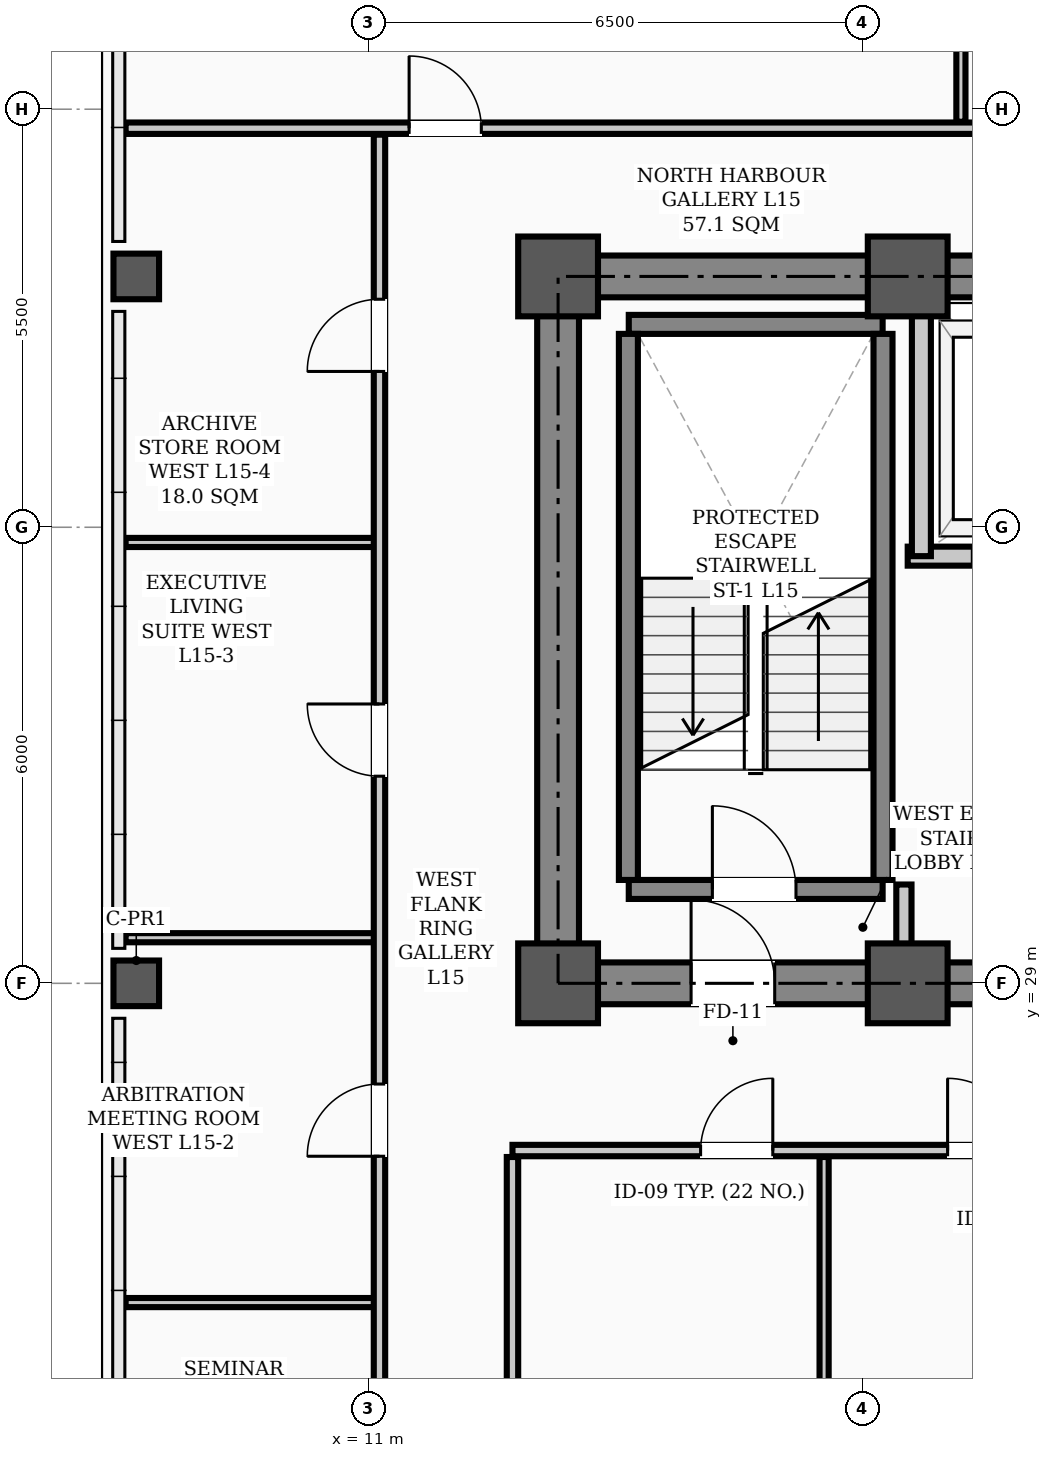
"""IFC4 building model, lengths in metres.
Left out: names, types, materials, properties, quantities, classifications, styles, units other than length and angle.
Written with IfcOpenShell. Run it as: python <this file> out.ifc"""

import sys

from ifc_helpers import new_model, si_unit, direction, frame, frame_2d, origin, origin_2d, place, context, subcontext, project, spatial, rectangle, hollow_rectangle, extrude, element, fill, save


model = new_model("IFC4")
c1 = context("Model", 3, precision=1e-05, world=origin(), true_north=direction((0.0, 1.0)))
c2 = subcontext(c1, "Body", "Model", "MODEL_VIEW")
j1 = project(units=[si_unit("LENGTHUNIT", "METRE"), si_unit("PLANEANGLEUNIT", "RADIAN")], contexts=[c1])
p1 = place(None, origin())
s1 = spatial("IfcSite", under=j1, at=p1, CompositionType="ELEMENT")
p2 = place(p1, origin())
s2 = spatial("IfcBuilding", under=s1, at=p2, CompositionType="ELEMENT")
p3 = place(p2, frame((0.0, 0.0, 61.6)))
s3 = spatial("IfcBuildingStorey", under=s2, at=p3, CompositionType="ELEMENT", Elevation=61.6)
for number, where, z_axis, x_axis in (
    (1, (13.5, 29.0, 0.0), (0.0, 0.0, 1.0), (1.0, 0.0, 0.0)),
    (2, (13.5, 38.3, 0.0), (0.0, 0.0, 1.0), (1.0, 0.0, 0.0)),
    (3, (18.1, 29.0, 0.0), (0.0, 0.0, 1.0), (1.0, 0.0, 0.0)),
    (4, (18.1, 38.3, 0.0), (0.0, 0.0, 1.0), (1.0, 0.0, 0.0)),
):
    element("IfcColumn", number, at=place(p3, frame(where, z_axis=z_axis, x_axis=x_axis)), inside=s3, PredefinedType="COLUMN", context=c2, shape_type="SweptSolid", body=[
        extrude(hollow_rectangle(XDim=1.05, YDim=1.05, WallThickness=0.038, InnerFilletRadius=0.019, OuterFilletRadius=0.057, at=origin_2d()), origin(), (0.0, 0.0, 1.0), 3.9),
    ])
for number, where, z_axis, x_axis in (
    (5, (7.95, 29.0, 0.0), (0.0, 0.0, 1.0), (1.0, 0.0, 0.0)),
    (6, (7.95, 38.3, 0.0), (0.0, 0.0, 1.0), (1.0, 0.0, 0.0)),
):
    element("IfcColumn", number, at=place(p3, frame(where, z_axis=z_axis, x_axis=x_axis)), inside=s3, PredefinedType="COLUMN", context=c2, shape_type="SweptSolid", body=[
        extrude(hollow_rectangle(XDim=0.6, YDim=0.6, WallThickness=0.026, InnerFilletRadius=0.013, OuterFilletRadius=0.039, at=origin_2d()), origin(), (0.0, 0.0, 1.0), 3.9),
    ])
p4 = place(p3, frame((13.5, 29.0, 0.0), z_axis=(0.0, 0.0, 1.0), x_axis=(1.0, 0.0, 0.0)))
e7 = element("IfcWall", 7, at=p4, inside=s3, PredefinedType="SHEAR", context=c2, shape_type="SweptSolid", body=[
    extrude(rectangle(XDim=30.5, YDim=0.55, at=frame_2d((15.25, 0.0))), origin(), (0.0, 0.0, 1.0), 3.72),
])
p5 = place(p4, frame((1.75, 0.0, 0.0)))
e8 = element("IfcOpeningElement", 8, at=p5, cuts=e7, PredefinedType="OPENING", context=c2, shape_type="SweptSolid", body=[
    extrude(rectangle(XDim=1.1, YDim=2.08, at=frame_2d((0.55, 1.04))), frame((0.0, 0.285, 0.0), z_axis=(0.0, -1.0, 0.0), x_axis=(1.0, 0.0, 0.0)), (0.0, 0.0, 1.0), 0.57),
])
p6 = place(p4, frame((26.7, 0.0, 0.0)))
e9 = element("IfcOpeningElement", 9, at=p6, cuts=e7, PredefinedType="OPENING", context=c2, shape_type="SweptSolid", body=[
    extrude(rectangle(XDim=1.1, YDim=2.08, at=frame_2d((0.55, 1.04))), frame((0.0, 0.285, 0.0), z_axis=(0.0, -1.0, 0.0), x_axis=(1.0, 0.0, 0.0)), (0.0, 0.0, 1.0), 0.57),
])
p7 = place(p4, frame((6.8, 0.0, 0.0)))
e10 = element("IfcOpeningElement", 10, at=p7, cuts=e7, PredefinedType="OPENING", context=c2, shape_type="SweptSolid", body=[
    extrude(rectangle(XDim=1.1, YDim=2.08, at=frame_2d((0.55, 1.04))), frame((0.0, 0.285, 0.0), z_axis=(0.0, -1.0, 0.0), x_axis=(1.0, 0.0, 0.0)), (0.0, 0.0, 1.0), 0.57),
])
p8 = place(p4, frame((13.2, 0.0, 0.0)))
e11 = element("IfcOpeningElement", 11, at=p8, cuts=e7, PredefinedType="OPENING", context=c2, shape_type="SweptSolid", body=[
    extrude(rectangle(XDim=1.6, YDim=2.08, at=frame_2d((0.8, 1.04))), frame((0.0, 0.285, 0.0), z_axis=(0.0, -1.0, 0.0), x_axis=(1.0, 0.0, 0.0)), (0.0, 0.0, 1.0), 0.57),
])
p9 = place(p4, frame((19.6, 0.0, 0.0)))
e12 = element("IfcOpeningElement", 12, at=p9, cuts=e7, PredefinedType="OPENING", context=c2, shape_type="SweptSolid", body=[
    extrude(rectangle(XDim=0.9, YDim=2.08, at=frame_2d((0.45, 1.04))), frame((0.0, 0.285, 0.0), z_axis=(0.0, -1.0, 0.0), x_axis=(1.0, 0.0, 0.0)), (0.0, 0.0, 1.0), 0.57),
])
p10 = place(p4, frame((21.6, 0.0, 0.0)))
e13 = element("IfcOpeningElement", 13, at=p10, cuts=e7, PredefinedType="OPENING", context=c2, shape_type="SweptSolid", body=[
    extrude(rectangle(XDim=0.9, YDim=2.08, at=frame_2d((0.45, 1.04))), frame((0.0, 0.285, 0.0), z_axis=(0.0, -1.0, 0.0), x_axis=(1.0, 0.0, 0.0)), (0.0, 0.0, 1.0), 0.57),
])
p11 = place(p3, frame((13.5, 38.3, 0.0), z_axis=(0.0, 0.0, 1.0), x_axis=(1.0, 0.0, 0.0)))
e14 = element("IfcWall", 14, at=p11, inside=s3, PredefinedType="SHEAR", context=c2, shape_type="SweptSolid", body=[
    extrude(rectangle(XDim=30.5, YDim=0.55, at=frame_2d((15.25, 0.0))), origin(), (0.0, 0.0, 1.0), 3.72),
])
p12 = place(p3, frame((13.5, 29.35, 0.0), z_axis=(0.0, 0.0, 1.0), x_axis=(0.0, 1.0, 0.0)))
e15 = element("IfcWall", 15, at=p12, inside=s3, PredefinedType="SHEAR", context=c2, shape_type="SweptSolid", body=[
    extrude(rectangle(XDim=8.6, YDim=0.55, at=frame_2d((4.3, 0.0))), origin(), (0.0, 0.0, 1.0), 3.72),
])
p13 = place(p3, frame((14.43, 30.235, 0.0), z_axis=(0.0, 0.0, 1.0), x_axis=(1.0, 0.0, 0.0)))
e16 = element("IfcWall", 16, at=p13, inside=s3, PredefinedType="STANDARD", context=c2, shape_type="SweptSolid", body=[
    extrude(rectangle(XDim=3.34, YDim=0.25, at=frame_2d((1.67, 0.0))), origin(), (0.0, 0.0, 1.0), 3.72),
])
p14 = place(p13, frame((1.1, 0.0, 0.0)))
e17 = element("IfcOpeningElement", 17, at=p14, cuts=e16, PredefinedType="OPENING", context=c2, shape_type="SweptSolid", body=[
    extrude(rectangle(XDim=1.1, YDim=2.08, at=frame_2d((0.55, 1.04))), frame((0.0, 0.135, 0.0), z_axis=(0.0, -1.0, 0.0), x_axis=(1.0, 0.0, 0.0)), (0.0, 0.0, 1.0), 0.27),
])
p15 = place(p3, frame((14.43, 37.669, 0.0), z_axis=(0.0, 0.0, 1.0), x_axis=(1.0, 0.0, 0.0)))
e18 = element("IfcWall", 18, at=p15, inside=s3, PredefinedType="STANDARD", context=c2, shape_type="SweptSolid", body=[
    extrude(rectangle(XDim=3.34, YDim=0.25, at=frame_2d((1.67, 0.0))), origin(), (0.0, 0.0, 1.0), 3.72),
])
for number, where, z_axis, x_axis in (
    (19, (14.425, 30.36, 0.0), (0.0, 0.0, 1.0), (0.0, 1.0, 0.0)),
    (20, (17.775, 30.36, 0.0), (0.0, 0.0, 1.0), (0.0, 1.0, 0.0)),
):
    element("IfcWall", number, at=place(p3, frame(where, z_axis=z_axis, x_axis=x_axis)), inside=s3, PredefinedType="STANDARD", context=c2, shape_type="SweptSolid", body=[
        extrude(rectangle(XDim=7.184, YDim=0.25, at=frame_2d((3.592, 0.0))), origin(), (0.0, 0.0, 1.0), 3.72),
    ])
p16 = place(p3, frame((18.1, 34.62, 0.0), z_axis=(0.0, 0.0, 1.0), x_axis=(1.0, 0.0, 0.0)))
e21 = element("IfcWall", 21, at=p16, inside=s3, PredefinedType="STANDARD", context=c2, shape_type="SweptSolid", body=[
    extrude(rectangle(XDim=5.35, YDim=0.25, at=frame_2d((2.675, 0.0))), origin(), (0.0, 0.0, 1.0), 3.72),
])
p17 = place(p16, frame((0.85, 0.0, 0.0)))
e22 = element("IfcOpeningElement", 22, at=p17, cuts=e21, PredefinedType="OPENING", context=c2, shape_type="SweptSolid", body=[
    extrude(rectangle(XDim=1.1, YDim=2.08, at=frame_2d((0.55, 1.04))), frame((0.0, 0.135, 0.0), z_axis=(0.0, -1.0, 0.0), x_axis=(1.0, 0.0, 0.0)), (0.0, 0.0, 1.0), 0.27),
])
p18 = place(p16, frame((3.45, 0.0, 0.0)))
e23 = element("IfcOpeningElement", 23, at=p18, cuts=e21, PredefinedType="OPENING", context=c2, shape_type="SweptSolid", body=[
    extrude(rectangle(XDim=1.1, YDim=2.08, at=frame_2d((0.55, 1.04))), frame((0.0, 0.135, 0.0), z_axis=(0.0, -1.0, 0.0), x_axis=(1.0, 0.0, 0.0)), (0.0, 0.0, 1.0), 0.27),
])
p19 = place(p3, frame((18.28, 34.62, 0.0), z_axis=(0.0, 0.0, 1.0), x_axis=(0.0, 1.0, 0.0)))
e24 = element("IfcWall", 24, at=p19, inside=s3, PredefinedType="STANDARD", context=c2, shape_type="SweptSolid", body=[
    extrude(rectangle(XDim=3.33, YDim=0.25, at=frame_2d((1.665, 0.0))), origin(), (0.0, 0.0, 1.0), 3.3),
])
p20 = place(p3, frame((12.9, 26.8, 0.0), z_axis=(0.0, 0.0, 1.0), x_axis=(1.0, 0.0, 0.0)))
e25 = element("IfcWall", 25, at=p20, inside=s3, PredefinedType="PARTITIONING", context=c2, shape_type="SweptSolid", body=[
    extrude(rectangle(XDim=31.7, YDim=0.15, at=frame_2d((15.85, 0.0))), origin(), (0.0, 0.0, 1.0), 3.1),
])
p21 = place(p20, frame((13.6, 0.0, 0.0)))
e26 = element("IfcOpeningElement", 26, at=p21, cuts=e25, PredefinedType="OPENING", context=c2, shape_type="SweptSolid", body=[
    extrude(rectangle(XDim=1.6, YDim=2.08, at=frame_2d((0.8, 1.04))), frame((0.0, 0.085, 0.0), z_axis=(0.0, -1.0, 0.0), x_axis=(1.0, 0.0, 0.0)), (0.0, 0.0, 1.0), 0.17),
])
p22 = place(p20, frame((2.475, 0.0, 0.0)))
e27 = element("IfcOpeningElement", 27, at=p22, cuts=e25, PredefinedType="OPENING", context=c2, shape_type="SweptSolid", body=[
    extrude(rectangle(XDim=0.95, YDim=2.08, at=frame_2d((0.475, 1.04))), frame((0.0, 0.085, 0.0), z_axis=(0.0, -1.0, 0.0), x_axis=(1.0, 0.0, 0.0)), (0.0, 0.0, 1.0), 0.17),
])
p23 = place(p20, frame((5.725, 0.0, 0.0)))
e28 = element("IfcOpeningElement", 28, at=p23, cuts=e25, PredefinedType="OPENING", context=c2, shape_type="SweptSolid", body=[
    extrude(rectangle(XDim=0.95, YDim=2.08, at=frame_2d((0.475, 1.04))), frame((0.0, 0.085, 0.0), z_axis=(0.0, -1.0, 0.0), x_axis=(1.0, 0.0, 0.0)), (0.0, 0.0, 1.0), 0.17),
])
p24 = place(p20, frame((8.875, 0.0, 0.0)))
e29 = element("IfcOpeningElement", 29, at=p24, cuts=e25, PredefinedType="OPENING", context=c2, shape_type="SweptSolid", body=[
    extrude(rectangle(XDim=0.95, YDim=2.08, at=frame_2d((0.475, 1.04))), frame((0.0, 0.085, 0.0), z_axis=(0.0, -1.0, 0.0), x_axis=(1.0, 0.0, 0.0)), (0.0, 0.0, 1.0), 0.17),
])
p25 = place(p20, frame((16.075, 0.0, 0.0)))
e30 = element("IfcOpeningElement", 30, at=p25, cuts=e25, PredefinedType="OPENING", context=c2, shape_type="SweptSolid", body=[
    extrude(rectangle(XDim=0.95, YDim=2.08, at=frame_2d((0.475, 1.04))), frame((0.0, 0.085, 0.0), z_axis=(0.0, -1.0, 0.0), x_axis=(1.0, 0.0, 0.0)), (0.0, 0.0, 1.0), 0.17),
])
p26 = place(p20, frame((22.525, 0.0, 0.0)))
e31 = element("IfcOpeningElement", 31, at=p26, cuts=e25, PredefinedType="OPENING", context=c2, shape_type="SweptSolid", body=[
    extrude(rectangle(XDim=0.95, YDim=2.08, at=frame_2d((0.475, 1.04))), frame((0.0, 0.085, 0.0), z_axis=(0.0, -1.0, 0.0), x_axis=(1.0, 0.0, 0.0)), (0.0, 0.0, 1.0), 0.17),
])
p27 = place(p20, frame((28.825, 0.0, 0.0)))
e32 = element("IfcOpeningElement", 32, at=p27, cuts=e25, PredefinedType="OPENING", context=c2, shape_type="SweptSolid", body=[
    extrude(rectangle(XDim=0.95, YDim=2.08, at=frame_2d((0.475, 1.04))), frame((0.0, 0.085, 0.0), z_axis=(0.0, -1.0, 0.0), x_axis=(1.0, 0.0, 0.0)), (0.0, 0.0, 1.0), 0.17),
])
p28 = place(p3, frame((7.81, 24.8, 0.0), z_axis=(0.0, 0.0, 1.0), x_axis=(1.0, 0.0, 0.0)))
e33 = element("IfcWall", 33, at=p28, inside=s3, PredefinedType="PARTITIONING", context=c2, shape_type="SweptSolid", body=[
    extrude(rectangle(XDim=3.34, YDim=0.12, at=frame_2d((1.67, 0.0))), origin(), (0.0, 0.0, 1.0), 3.212),
])
p29 = place(p3, frame((7.81, 29.6, 0.0), z_axis=(0.0, 0.0, 1.0), x_axis=(1.0, 0.0, 0.0)))
e34 = element("IfcWall", 34, at=p29, inside=s3, PredefinedType="PARTITIONING", context=c2, shape_type="SweptSolid", body=[
    extrude(rectangle(XDim=3.34, YDim=0.12, at=frame_2d((1.67, 0.0))), origin(), (0.0, 0.0, 1.0), 3.0),
])
p30 = place(p3, frame((7.81, 34.8, 0.0), z_axis=(0.0, 0.0, 1.0), x_axis=(1.0, 0.0, 0.0)))
e35 = element("IfcWall", 35, at=p30, inside=s3, PredefinedType="PARTITIONING", context=c2, shape_type="SweptSolid", body=[
    extrude(rectangle(XDim=3.34, YDim=0.12, at=frame_2d((1.67, 0.0))), origin(), (0.0, 0.0, 1.0), 3.212),
])
p31 = place(p3, frame((7.81, 40.25, 0.0), z_axis=(0.0, 0.0, 1.0), x_axis=(1.0, 0.0, 0.0)))
e36 = element("IfcWall", 36, at=p31, inside=s3, PredefinedType="PARTITIONING", context=c2, shape_type="SweptSolid", body=[
    extrude(rectangle(XDim=49.38, YDim=0.15, at=frame_2d((24.69, 0.0))), origin(), (0.0, 0.0, 1.0), 3.1),
])
p32 = place(p31, frame((3.73, 0.0, 0.0)))
e37 = element("IfcOpeningElement", 37, at=p32, cuts=e36, PredefinedType="OPENING", context=c2, shape_type="SweptSolid", body=[
    extrude(rectangle(XDim=0.95, YDim=2.08, at=frame_2d((0.475, 1.04))), frame((0.0, 0.085, 0.0), z_axis=(0.0, -1.0, 0.0), x_axis=(1.0, 0.0, 0.0)), (0.0, 0.0, 1.0), 0.17),
])
p33 = place(p31, frame((13.815, 0.0, 0.0)))
e38 = element("IfcOpeningElement", 38, at=p33, cuts=e36, PredefinedType="OPENING", context=c2, shape_type="SweptSolid", body=[
    extrude(rectangle(XDim=0.95, YDim=2.08, at=frame_2d((0.475, 1.04))), frame((0.0, 0.085, 0.0), z_axis=(0.0, -1.0, 0.0), x_axis=(1.0, 0.0, 0.0)), (0.0, 0.0, 1.0), 0.17),
])
p34 = place(p31, frame((19.965, 0.0, 0.0)))
e39 = element("IfcOpeningElement", 39, at=p34, cuts=e36, PredefinedType="OPENING", context=c2, shape_type="SweptSolid", body=[
    extrude(rectangle(XDim=0.95, YDim=2.08, at=frame_2d((0.475, 1.04))), frame((0.0, 0.085, 0.0), z_axis=(0.0, -1.0, 0.0), x_axis=(1.0, 0.0, 0.0)), (0.0, 0.0, 1.0), 0.17),
])
p35 = place(p31, frame((30.815, 0.0, 0.0)))
e40 = element("IfcOpeningElement", 40, at=p35, cuts=e36, PredefinedType="OPENING", context=c2, shape_type="SweptSolid", body=[
    extrude(rectangle(XDim=0.95, YDim=2.08, at=frame_2d((0.475, 1.04))), frame((0.0, 0.085, 0.0), z_axis=(0.0, -1.0, 0.0), x_axis=(1.0, 0.0, 0.0)), (0.0, 0.0, 1.0), 0.17),
])
p36 = place(p31, frame((37.2, 0.0, 0.0)))
e41 = element("IfcOpeningElement", 41, at=p36, cuts=e36, PredefinedType="OPENING", context=c2, shape_type="SweptSolid", body=[
    extrude(rectangle(XDim=0.95, YDim=2.08, at=frame_2d((0.475, 1.04))), frame((0.0, 0.085, 0.0), z_axis=(0.0, -1.0, 0.0), x_axis=(1.0, 0.0, 0.0)), (0.0, 0.0, 1.0), 0.17),
])
p37 = place(p3, frame((18.05, 29.285, 0.0), z_axis=(0.0, 0.0, 1.0), x_axis=(0.0, 1.0, 0.0)))
e42 = element("IfcWall", 42, at=p37, inside=s3, PredefinedType="STANDARD", context=c2, shape_type="SweptSolid", body=[
    extrude(rectangle(XDim=1.015, YDim=0.2, at=frame_2d((0.508, 0.0))), origin(), (0.0, 0.0, 1.0), 3.3),
])
p38 = place(p3, frame((11.15, 17.635, 0.0), z_axis=(0.0, 0.0, 1.0), x_axis=(0.0, 1.0, 0.0)))
e43 = element("IfcWall", 43, at=p38, inside=s3, PredefinedType="PARTITIONING", context=c2, shape_type="SweptSolid", body=[
    extrude(rectangle(XDim=22.53, YDim=0.15, at=frame_2d((11.265, 0.0))), origin(), (0.0, 0.0, 1.0), 3.0),
])
p39 = place(p38, frame((3.065, 0.0, 0.0)))
e44 = element("IfcOpeningElement", 44, at=p39, cuts=e43, PredefinedType="OPENING", context=c2, shape_type="SweptSolid", body=[
    extrude(rectangle(XDim=0.95, YDim=2.08, at=frame_2d((0.475, 1.04))), frame((0.0, 0.085, 0.0), z_axis=(0.0, -1.0, 0.0), x_axis=(1.0, 0.0, 0.0)), (0.0, 0.0, 1.0), 0.17),
])
p40 = place(p38, frame((9.09, 0.0, 0.0)))
e45 = element("IfcOpeningElement", 45, at=p40, cuts=e43, PredefinedType="OPENING", context=c2, shape_type="SweptSolid", body=[
    extrude(rectangle(XDim=0.95, YDim=2.08, at=frame_2d((0.475, 1.04))), frame((0.0, 0.085, 0.0), z_axis=(0.0, -1.0, 0.0), x_axis=(1.0, 0.0, 0.0)), (0.0, 0.0, 1.0), 0.17),
])
p41 = place(p38, frame((14.09, 0.0, 0.0)))
e46 = element("IfcOpeningElement", 46, at=p41, cuts=e43, PredefinedType="OPENING", context=c2, shape_type="SweptSolid", body=[
    extrude(rectangle(XDim=0.95, YDim=2.08, at=frame_2d((0.475, 1.04))), frame((0.0, 0.085, 0.0), z_axis=(0.0, -1.0, 0.0), x_axis=(1.0, 0.0, 0.0)), (0.0, 0.0, 1.0), 0.17),
])
p42 = place(p38, frame((19.415, 0.0, 0.0)))
e47 = element("IfcOpeningElement", 47, at=p42, cuts=e43, PredefinedType="OPENING", context=c2, shape_type="SweptSolid", body=[
    extrude(rectangle(XDim=0.95, YDim=2.08, at=frame_2d((0.475, 1.04))), frame((0.0, 0.085, 0.0), z_axis=(0.0, -1.0, 0.0), x_axis=(1.0, 0.0, 0.0)), (0.0, 0.0, 1.0), 0.17),
])
p43 = place(p3, frame((12.9, 19.335, 0.0), z_axis=(0.0, 0.0, 1.0), x_axis=(0.0, 1.0, 0.0)))
e48 = element("IfcWall", 48, at=p43, inside=s3, PredefinedType="PARTITIONING", context=c2, shape_type="SweptSolid", body=[
    extrude(rectangle(XDim=7.38, YDim=0.15, at=frame_2d((3.69, 0.0))), origin(), (0.0, 0.0, 1.0), 3.0),
])
p44 = place(p3, frame((17.0, 19.335, 0.0), z_axis=(0.0, 0.0, 1.0), x_axis=(0.0, 1.0, 0.0)))
e49 = element("IfcWall", 49, at=p44, inside=s3, PredefinedType="PARTITIONING", context=c2, shape_type="SweptSolid", body=[
    extrude(rectangle(XDim=7.38, YDim=0.12, at=frame_2d((3.69, 0.0))), origin(), (0.0, 0.0, 1.0), 3.0),
])
p45 = place(p3, frame((18.8, 40.335, 0.0), z_axis=(0.0, 0.0, 1.0), x_axis=(0.0, 1.0, 0.0)))
e50 = element("IfcWall", 50, at=p45, inside=s3, PredefinedType="PARTITIONING", context=c2, shape_type="SweptSolid", body=[
    extrude(rectangle(XDim=6.355, YDim=0.12, at=frame_2d((3.177, 0.0))), origin(), (0.0, 0.0, 1.0), 3.212),
])
p46 = place(p14, origin())
e51 = element("IfcDoor", 51, at=p46, inside=s3, OperationType="SINGLE_SWING_LEFT", PredefinedType="DOOR", context=c2, shape_type="SweptSolid", body=[
    extrude(rectangle(XDim=1.1, YDim=2.08, at=frame_2d((0.55, 1.04))), frame((0.0, 0.025, 0.0), z_axis=(0.0, -1.0, 0.0), x_axis=(1.0, 0.0, 0.0)), (0.0, 0.0, 1.0), 0.05),
])
fill(e17, e51)
p47 = place(p5, origin())
e52 = element("IfcDoor", 52, at=p47, inside=s3, OperationType="SINGLE_SWING_LEFT", PredefinedType="DOOR", context=c2, shape_type="SweptSolid", body=[
    extrude(rectangle(XDim=1.1, YDim=2.08, at=frame_2d((0.55, 1.04))), frame((0.0, 0.025, 0.0), z_axis=(0.0, -1.0, 0.0), x_axis=(1.0, 0.0, 0.0)), (0.0, 0.0, 1.0), 0.05),
])
fill(e8, e52)
p48 = place(p22, origin())
e53 = element("IfcDoor", 53, at=p48, inside=s3, OperationType="SINGLE_SWING_RIGHT", PredefinedType="DOOR", context=c2, shape_type="SweptSolid", body=[
    extrude(rectangle(XDim=0.95, YDim=2.08, at=frame_2d((0.475, 1.04))), frame((0.0, 0.025, 0.0), z_axis=(0.0, -1.0, 0.0), x_axis=(1.0, 0.0, 0.0)), (0.0, 0.0, 1.0), 0.05),
])
fill(e27, e53)
p49 = place(p23, origin())
e54 = element("IfcDoor", 54, at=p49, inside=s3, OperationType="SINGLE_SWING_LEFT", PredefinedType="DOOR", context=c2, shape_type="SweptSolid", body=[
    extrude(rectangle(XDim=0.95, YDim=2.08, at=frame_2d((0.475, 1.04))), frame((0.0, 0.025, 0.0), z_axis=(0.0, -1.0, 0.0), x_axis=(1.0, 0.0, 0.0)), (0.0, 0.0, 1.0), 0.05),
])
fill(e28, e54)
p50 = place(p40, origin())
e55 = element("IfcDoor", 55, at=p50, inside=s3, OperationType="SINGLE_SWING_LEFT", PredefinedType="DOOR", context=c2, shape_type="SweptSolid", body=[
    extrude(rectangle(XDim=0.95, YDim=2.08, at=frame_2d((0.475, 1.04))), frame((0.0, 0.025, 0.0), z_axis=(0.0, -1.0, 0.0), x_axis=(1.0, 0.0, 0.0)), (0.0, 0.0, 1.0), 0.05),
])
fill(e45, e55)
p51 = place(p41, origin())
e56 = element("IfcDoor", 56, at=p51, inside=s3, OperationType="SINGLE_SWING_RIGHT", PredefinedType="DOOR", context=c2, shape_type="SweptSolid", body=[
    extrude(rectangle(XDim=0.95, YDim=2.08, at=frame_2d((0.475, 1.04))), frame((0.0, 0.025, 0.0), z_axis=(0.0, -1.0, 0.0), x_axis=(1.0, 0.0, 0.0)), (0.0, 0.0, 1.0), 0.05),
])
fill(e46, e56)
p52 = place(p42, origin())
e57 = element("IfcDoor", 57, at=p52, inside=s3, OperationType="SINGLE_SWING_LEFT", PredefinedType="DOOR", context=c2, shape_type="SweptSolid", body=[
    extrude(rectangle(XDim=0.95, YDim=2.08, at=frame_2d((0.475, 1.04))), frame((0.0, 0.025, 0.0), z_axis=(0.0, -1.0, 0.0), x_axis=(1.0, 0.0, 0.0)), (0.0, 0.0, 1.0), 0.05),
])
fill(e47, e57)
p53 = place(p32, origin())
e58 = element("IfcDoor", 58, at=p53, inside=s3, OperationType="SINGLE_SWING_LEFT", PredefinedType="DOOR", context=c2, shape_type="SweptSolid", body=[
    extrude(rectangle(XDim=0.95, YDim=2.08, at=frame_2d((0.475, 1.04))), frame((0.0, 0.025, 0.0), z_axis=(0.0, -1.0, 0.0), x_axis=(1.0, 0.0, 0.0)), (0.0, 0.0, 1.0), 0.05),
])
fill(e37, e58)
save(model, sys.argv[1])
